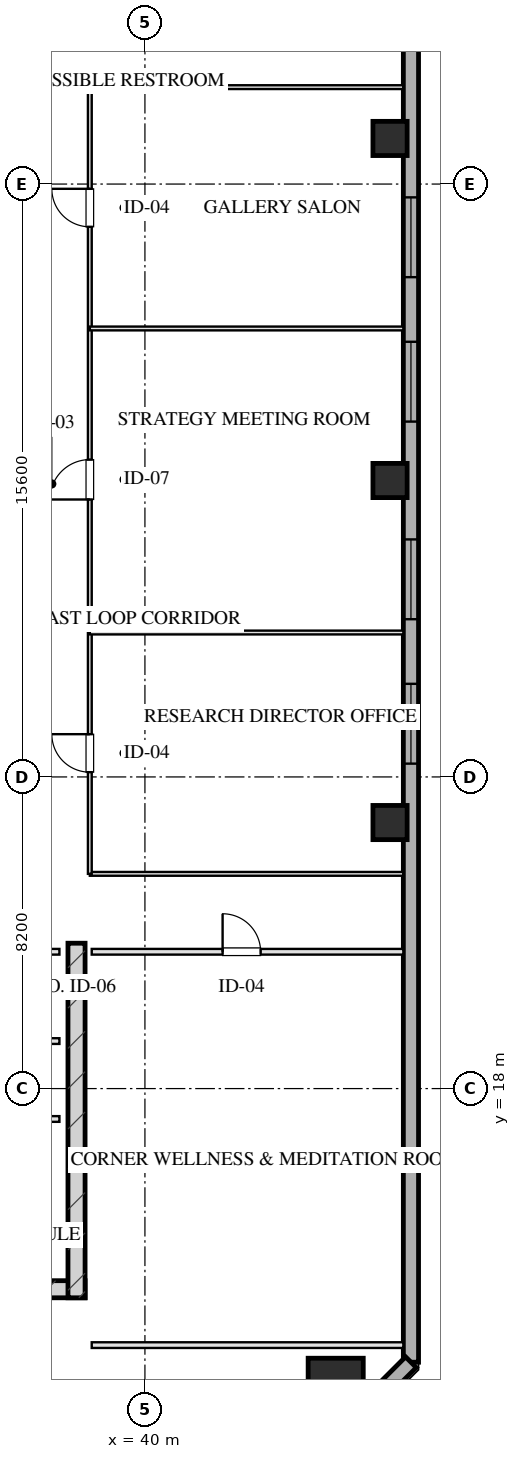
"""IFC4 building model, lengths in metres.
Left out: names, types, materials, properties, quantities, classifications, styles, units other than length and angle.
Written with IfcOpenShell. Run it as: python <this file> out.ifc"""

import sys

from ifc_helpers import new_model, si_unit, direction, frame, frame_2d, origin, origin_2d, place, context, subcontext, project, spatial, rectangle, hollow_rectangle, extrude, element, fill, save


model = new_model("IFC4")
c1 = context("Model", 3, precision=1e-05, world=origin(), true_north=direction((0.0, 1.0)))
c2 = subcontext(c1, "Body", "Model", "MODEL_VIEW")
j1 = project(units=[si_unit("LENGTHUNIT", "METRE"), si_unit("PLANEANGLEUNIT", "RADIAN")], contexts=[c1])
p1 = place(None, origin())
s1 = spatial("IfcSite", under=j1, at=p1, CompositionType="ELEMENT")
p2 = place(p1, origin())
s2 = spatial("IfcBuilding", under=s1, at=p2, CompositionType="ELEMENT")
p3 = place(p2, frame((0.0, 0.0, 212.75)))
s3 = spatial("IfcBuildingStorey", under=s2, at=p3, CompositionType="ELEMENT", Elevation=212.75)
p4 = place(p3, frame((21.575, 12.72, 0.0), z_axis=(0.0, 0.0, 1.0), x_axis=(1.0, 0.0, 0.0)))
e1 = element("IfcWall", 1, at=p4, inside=s3, PredefinedType="SHEAR", context=c2, shape_type="SweptSolid", body=[
    extrude(rectangle(XDim=16.85, YDim=0.45, at=frame_2d((8.425, 0.0))), origin(), (0.0, 0.0, 1.0), 3.45),
])
p5 = place(p3, frame((38.2, 21.825, 0.0), z_axis=(0.0, 0.0, 1.0), x_axis=(0.0, -1.0, 0.0)))
e2 = element("IfcWall", 2, at=p5, inside=s3, PredefinedType="SHEAR", context=c2, shape_type="SweptSolid", body=[
    extrude(rectangle(XDim=9.33, YDim=0.45, at=frame_2d((4.665, 0.0))), origin(), (0.0, 0.0, 1.0), 3.45),
])
p6 = place(p3, frame((45.02, 10.18, 0.0), z_axis=(0.0, 0.0, 1.0), x_axis=(1.0, 0.0, 0.0)))
e3 = element("IfcColumn", 3, at=p6, inside=s3, PredefinedType="COLUMN", context=c2, shape_type="SweptSolid", body=[
    extrude(hollow_rectangle(XDim=1.45, YDim=1.45, WallThickness=0.05, at=origin_2d()), origin(), (0.0, 0.0, 1.0), 3.451),
])
for number, where, z_axis, x_axis in (
    (4, (46.45, 25.0, 0.0), (0.0, 0.0, 1.0), (1.0, 0.0, 0.0)),
    (5, (46.45, 34.0, 0.0), (0.0, 0.0, 1.0), (1.0, 0.0, 0.0)),
    (6, (46.45, 43.0, 0.0), (0.0, 0.0, 1.0), (1.0, 0.0, 0.0)),
):
    element("IfcColumn", number, at=place(p3, frame(where, z_axis=z_axis, x_axis=x_axis)), inside=s3, PredefinedType="COLUMN", context=c2, shape_type="SweptSolid", body=[
        extrude(hollow_rectangle(XDim=0.9, YDim=0.9, WallThickness=0.032, at=origin_2d()), origin(), (0.0, 0.0, 1.0), 3.451),
    ])
p7 = place(p3, frame((47.0, 57.2, 0.0), z_axis=(0.0, 0.0, 1.0), x_axis=(0.0, -1.0, 0.0)))
e7 = element("IfcWall", 7, at=p7, inside=s3, PredefinedType="SOLIDWALL", context=c2, shape_type="SweptSolid", body=[
    extrude(rectangle(XDim=46.4, YDim=0.4, at=frame_2d((23.2, 0.0))), origin(), (0.0, 0.0, 1.0), 2.55),
])
p8 = place(p7, frame((28.55, 0.0, 0.75)))
e8 = element("IfcOpeningElement", 8, at=p8, cuts=e7, PredefinedType="OPENING", context=c2, shape_type="SweptSolid", body=[
    extrude(rectangle(XDim=2.1, YDim=1.4, at=frame_2d((1.05, 0.7))), frame((0.0, 0.21, 0.0), z_axis=(0.0, -1.0, 0.0), x_axis=(1.0, 0.0, 0.0)), (0.0, 0.0, 1.0), 0.42),
])
p9 = place(p7, frame((24.75, 0.0, 0.75)))
e9 = element("IfcOpeningElement", 9, at=p9, cuts=e7, PredefinedType="OPENING", context=c2, shape_type="SweptSolid", body=[
    extrude(rectangle(XDim=2.1, YDim=1.4, at=frame_2d((1.05, 0.7))), frame((0.0, 0.21, 0.0), z_axis=(0.0, -1.0, 0.0), x_axis=(1.0, 0.0, 0.0)), (0.0, 0.0, 1.0), 0.42),
])
p10 = place(p7, frame((19.55, 0.0, 0.75)))
e10 = element("IfcOpeningElement", 10, at=p10, cuts=e7, PredefinedType="OPENING", context=c2, shape_type="SweptSolid", body=[
    extrude(rectangle(XDim=2.1, YDim=1.4, at=frame_2d((1.05, 0.7))), frame((0.0, 0.21, 0.0), z_axis=(0.0, -1.0, 0.0), x_axis=(1.0, 0.0, 0.0)), (0.0, 0.0, 1.0), 0.42),
])
p11 = place(p7, frame((15.75, 0.0, 0.75)))
e11 = element("IfcOpeningElement", 11, at=p11, cuts=e7, PredefinedType="OPENING", context=c2, shape_type="SweptSolid", body=[
    extrude(rectangle(XDim=2.1, YDim=1.4, at=frame_2d((1.05, 0.7))), frame((0.0, 0.21, 0.0), z_axis=(0.0, -1.0, 0.0), x_axis=(1.0, 0.0, 0.0)), (0.0, 0.0, 1.0), 0.42),
])
p12 = place(p3, frame((47.0, 10.8, 0.0), z_axis=(0.0, 0.0, 1.0), x_axis=(-0.707106781187, -0.707106781187, 0.0)))
e12 = element("IfcWall", 12, at=p12, inside=s3, PredefinedType="SOLIDWALL", context=c2, shape_type="SweptSolid", body=[
    extrude(rectangle(XDim=3.677, YDim=0.4, at=frame_2d((1.838, 0.0))), origin(), (0.0, 0.0, 1.0), 2.55),
])
p13 = place(p3, frame((33.95, 21.6, 0.0), z_axis=(0.0, 0.0, 1.0), x_axis=(1.0, 0.0, 0.0)))
e13 = element("IfcWall", 13, at=p13, inside=s3, PredefinedType="PARTITIONING", context=c2, shape_type="SweptSolid", body=[
    extrude(rectangle(XDim=3.8, YDim=0.15, at=frame_2d((1.9, 0.0))), origin(), (0.0, 0.0, 1.0), 3.155),
])
p14 = place(p13, frame((0.22, 0.0, 0.0)))
e14 = element("IfcOpeningElement", 14, at=p14, cuts=e13, PredefinedType="OPENING", context=c2, shape_type="SweptSolid", body=[
    extrude(rectangle(XDim=0.95, YDim=2.05, at=frame_2d((0.475, 1.025))), frame((0.0, 0.085, 0.0), z_axis=(0.0, -1.0, 0.0), x_axis=(1.0, 0.0, 0.0)), (0.0, 0.0, 1.0), 0.17),
])
p15 = place(p13, frame((1.95, 0.0, 0.0)))
e15 = element("IfcOpeningElement", 15, at=p15, cuts=e13, PredefinedType="OPENING", context=c2, shape_type="SweptSolid", body=[
    extrude(rectangle(XDim=0.9, YDim=2.05, at=frame_2d((0.45, 1.025))), frame((0.0, 0.085, 0.0), z_axis=(0.0, -1.0, 0.0), x_axis=(1.0, 0.0, 0.0)), (0.0, 0.0, 1.0), 0.17),
])
for number, where, z_axis, x_axis in (
    (16, (35.45, 17.2, 0.0), (0.0, 0.0, 1.0), (1.0, 0.0, 0.0)),
    (17, (35.45, 19.25, 0.0), (0.0, 0.0, 1.0), (1.0, 0.0, 0.0)),
):
    element("IfcWall", number, at=place(p3, frame(where, z_axis=z_axis, x_axis=x_axis)), inside=s3, PredefinedType="PARTITIONING", context=c2, shape_type="SweptSolid", body=[
        extrude(rectangle(XDim=2.3, YDim=0.15, at=frame_2d((1.15, 0.0))), origin(), (0.0, 0.0, 1.0), 3.155),
    ])
p16 = place(p3, frame((38.6, 11.25, 0.0), z_axis=(0.0, 0.0, 1.0), x_axis=(1.0, 0.0, 0.0)))
e18 = element("IfcWall", 18, at=p16, inside=s3, PredefinedType="PARTITIONING", context=c2, shape_type="SweptSolid", body=[
    extrude(rectangle(XDim=8.2, YDim=0.15, at=frame_2d((4.1, 0.0))), origin(), (0.0, 0.0, 1.0), 3.155),
])
p17 = place(p3, frame((38.6, 21.6, 0.0), z_axis=(0.0, 0.0, 1.0), x_axis=(1.0, 0.0, 0.0)))
e19 = element("IfcWall", 19, at=p17, inside=s3, PredefinedType="PARTITIONING", context=c2, shape_type="SweptSolid", body=[
    extrude(rectangle(XDim=8.2, YDim=0.15, at=frame_2d((4.1, 0.0))), origin(), (0.0, 0.0, 1.0), 3.155),
])
p18 = place(p17, frame((3.444, 0.0, 0.0)))
e20 = element("IfcOpeningElement", 20, at=p18, cuts=e19, PredefinedType="OPENING", context=c2, shape_type="SweptSolid", body=[
    extrude(rectangle(XDim=1.0, YDim=2.05, at=frame_2d((0.5, 1.025))), frame((0.0, 0.085, 0.0), z_axis=(0.0, -1.0, 0.0), x_axis=(1.0, 0.0, 0.0)), (0.0, 0.0, 1.0), 0.17),
])
for number, where, z_axis, x_axis in (
    (21, (38.55, 23.65, 0.0), (0.0, 0.0, 1.0), (1.0, 0.0, 0.0)),
    (22, (38.55, 44.35, 0.0), (0.0, 0.0, 1.0), (1.0, 0.0, 0.0)),
):
    element("IfcWall", number, at=place(p3, frame(where, z_axis=z_axis, x_axis=x_axis)), inside=s3, PredefinedType="MOVABLE", context=c2, shape_type="SweptSolid", body=[
        extrude(rectangle(XDim=8.25, YDim=0.1, at=frame_2d((4.125, 0.0))), origin(), (0.0, 0.0, 1.0), 3.155),
    ])
p19 = place(p3, frame((38.55, 23.65, 0.0), z_axis=(0.0, 0.0, 1.0), x_axis=(0.0, 1.0, 0.0)))
e23 = element("IfcWall", 23, at=p19, inside=s3, PredefinedType="MOVABLE", context=c2, shape_type="SweptSolid", body=[
    extrude(rectangle(XDim=20.7, YDim=0.1, at=frame_2d((10.35, 0.0))), origin(), (0.0, 0.0, 1.0), 3.155),
])
p20 = place(p19, frame((2.675, 0.0, 0.0)))
e24 = element("IfcOpeningElement", 24, at=p20, cuts=e23, PredefinedType="OPENING", context=c2, shape_type="SweptSolid", body=[
    extrude(rectangle(XDim=1.0, YDim=2.05, at=frame_2d((0.5, 1.025))), frame((0.0, 0.06, 0.0), z_axis=(0.0, -1.0, 0.0), x_axis=(1.0, 0.0, 0.0)), (0.0, 0.0, 1.0), 0.12),
])
p21 = place(p19, frame((9.85, 0.0, 0.0)))
e25 = element("IfcOpeningElement", 25, at=p21, cuts=e23, PredefinedType="OPENING", context=c2, shape_type="SweptSolid", body=[
    extrude(rectangle(XDim=1.05, YDim=2.05, at=frame_2d((0.525, 1.025))), frame((0.0, 0.06, 0.0), z_axis=(0.0, -1.0, 0.0), x_axis=(1.0, 0.0, 0.0)), (0.0, 0.0, 1.0), 0.12),
])
p22 = place(p19, frame((17.025, 0.0, 0.0)))
e26 = element("IfcOpeningElement", 26, at=p22, cuts=e23, PredefinedType="OPENING", context=c2, shape_type="SweptSolid", body=[
    extrude(rectangle(XDim=1.0, YDim=2.05, at=frame_2d((0.5, 1.025))), frame((0.0, 0.06, 0.0), z_axis=(0.0, -1.0, 0.0), x_axis=(1.0, 0.0, 0.0)), (0.0, 0.0, 1.0), 0.12),
])
for number, where, z_axis, x_axis in (
    (27, (38.55, 30.0, 0.0), (0.0, 0.0, 1.0), (1.0, 0.0, 0.0)),
    (28, (38.55, 38.0, 0.0), (0.0, 0.0, 1.0), (1.0, 0.0, 0.0)),
):
    element("IfcWall", number, at=place(p3, frame(where, z_axis=z_axis, x_axis=x_axis)), inside=s3, PredefinedType="MOVABLE", context=c2, shape_type="SweptSolid", body=[
        extrude(rectangle(XDim=8.25, YDim=0.1, at=frame_2d((4.125, 0.0))), origin(), (0.0, 0.0, 1.0), 3.155),
    ])
p23 = place(p8, origin())
e29 = element("IfcWindow", 29, at=p23, inside=s3, PartitioningType="TRIPLE_PANEL_VERTICAL", PredefinedType="WINDOW", context=c2, shape_type="SweptSolid", body=[
    extrude(rectangle(XDim=2.1, YDim=1.4, at=frame_2d((1.05, 0.7))), frame((0.0, 0.03, 0.0), z_axis=(0.0, -1.0, 0.0), x_axis=(1.0, 0.0, 0.0)), (0.0, 0.0, 1.0), 0.06),
])
fill(e8, e29)
p24 = place(p9, origin())
e30 = element("IfcWindow", 30, at=p24, inside=s3, PartitioningType="TRIPLE_PANEL_VERTICAL", PredefinedType="WINDOW", context=c2, shape_type="SweptSolid", body=[
    extrude(rectangle(XDim=2.1, YDim=1.4, at=frame_2d((1.05, 0.7))), frame((0.0, 0.03, 0.0), z_axis=(0.0, -1.0, 0.0), x_axis=(1.0, 0.0, 0.0)), (0.0, 0.0, 1.0), 0.06),
])
fill(e9, e30)
p25 = place(p10, origin())
e31 = element("IfcWindow", 31, at=p25, inside=s3, PartitioningType="TRIPLE_PANEL_VERTICAL", PredefinedType="WINDOW", context=c2, shape_type="SweptSolid", body=[
    extrude(rectangle(XDim=2.1, YDim=1.4, at=frame_2d((1.05, 0.7))), frame((0.0, 0.03, 0.0), z_axis=(0.0, -1.0, 0.0), x_axis=(1.0, 0.0, 0.0)), (0.0, 0.0, 1.0), 0.06),
])
fill(e10, e31)
p26 = place(p11, origin())
e32 = element("IfcWindow", 32, at=p26, inside=s3, PartitioningType="TRIPLE_PANEL_VERTICAL", PredefinedType="WINDOW", context=c2, shape_type="SweptSolid", body=[
    extrude(rectangle(XDim=2.1, YDim=1.4, at=frame_2d((1.05, 0.7))), frame((0.0, 0.03, 0.0), z_axis=(0.0, -1.0, 0.0), x_axis=(1.0, 0.0, 0.0)), (0.0, 0.0, 1.0), 0.06),
])
fill(e11, e32)
p27 = place(p18, origin())
e33 = element("IfcDoor", 33, at=p27, inside=s3, OperationType="SINGLE_SWING_LEFT", PredefinedType="DOOR", context=c2, shape_type="SweptSolid", body=[
    extrude(rectangle(XDim=1.0, YDim=2.05, at=frame_2d((0.5, 1.025))), frame((0.0, 0.025, 0.0), z_axis=(0.0, -1.0, 0.0), x_axis=(1.0, 0.0, 0.0)), (0.0, 0.0, 1.0), 0.05),
])
fill(e20, e33)
p28 = place(p20, origin())
e34 = element("IfcDoor", 34, at=p28, inside=s3, OperationType="SINGLE_SWING_RIGHT", PredefinedType="DOOR", context=c2, shape_type="SweptSolid", body=[
    extrude(rectangle(XDim=1.0, YDim=2.05, at=frame_2d((0.5, 1.025))), frame((0.0, 0.025, 0.0), z_axis=(0.0, -1.0, 0.0), x_axis=(1.0, 0.0, 0.0)), (0.0, 0.0, 1.0), 0.05),
])
fill(e24, e34)
p29 = place(p21, origin())
e35 = element("IfcDoor", 35, at=p29, inside=s3, OperationType="SINGLE_SWING_LEFT", PredefinedType="DOOR", context=c2, shape_type="SweptSolid", body=[
    extrude(rectangle(XDim=1.05, YDim=2.05, at=frame_2d((0.525, 1.025))), frame((0.0, 0.025, 0.0), z_axis=(0.0, -1.0, 0.0), x_axis=(1.0, 0.0, 0.0)), (0.0, 0.0, 1.0), 0.05),
])
fill(e25, e35)
p30 = place(p22, origin())
e36 = element("IfcDoor", 36, at=p30, inside=s3, OperationType="SINGLE_SWING_RIGHT", PredefinedType="DOOR", context=c2, shape_type="SweptSolid", body=[
    extrude(rectangle(XDim=1.0, YDim=2.05, at=frame_2d((0.5, 1.025))), frame((0.0, 0.025, 0.0), z_axis=(0.0, -1.0, 0.0), x_axis=(1.0, 0.0, 0.0)), (0.0, 0.0, 1.0), 0.05),
])
fill(e26, e36)
save(model, sys.argv[1])
